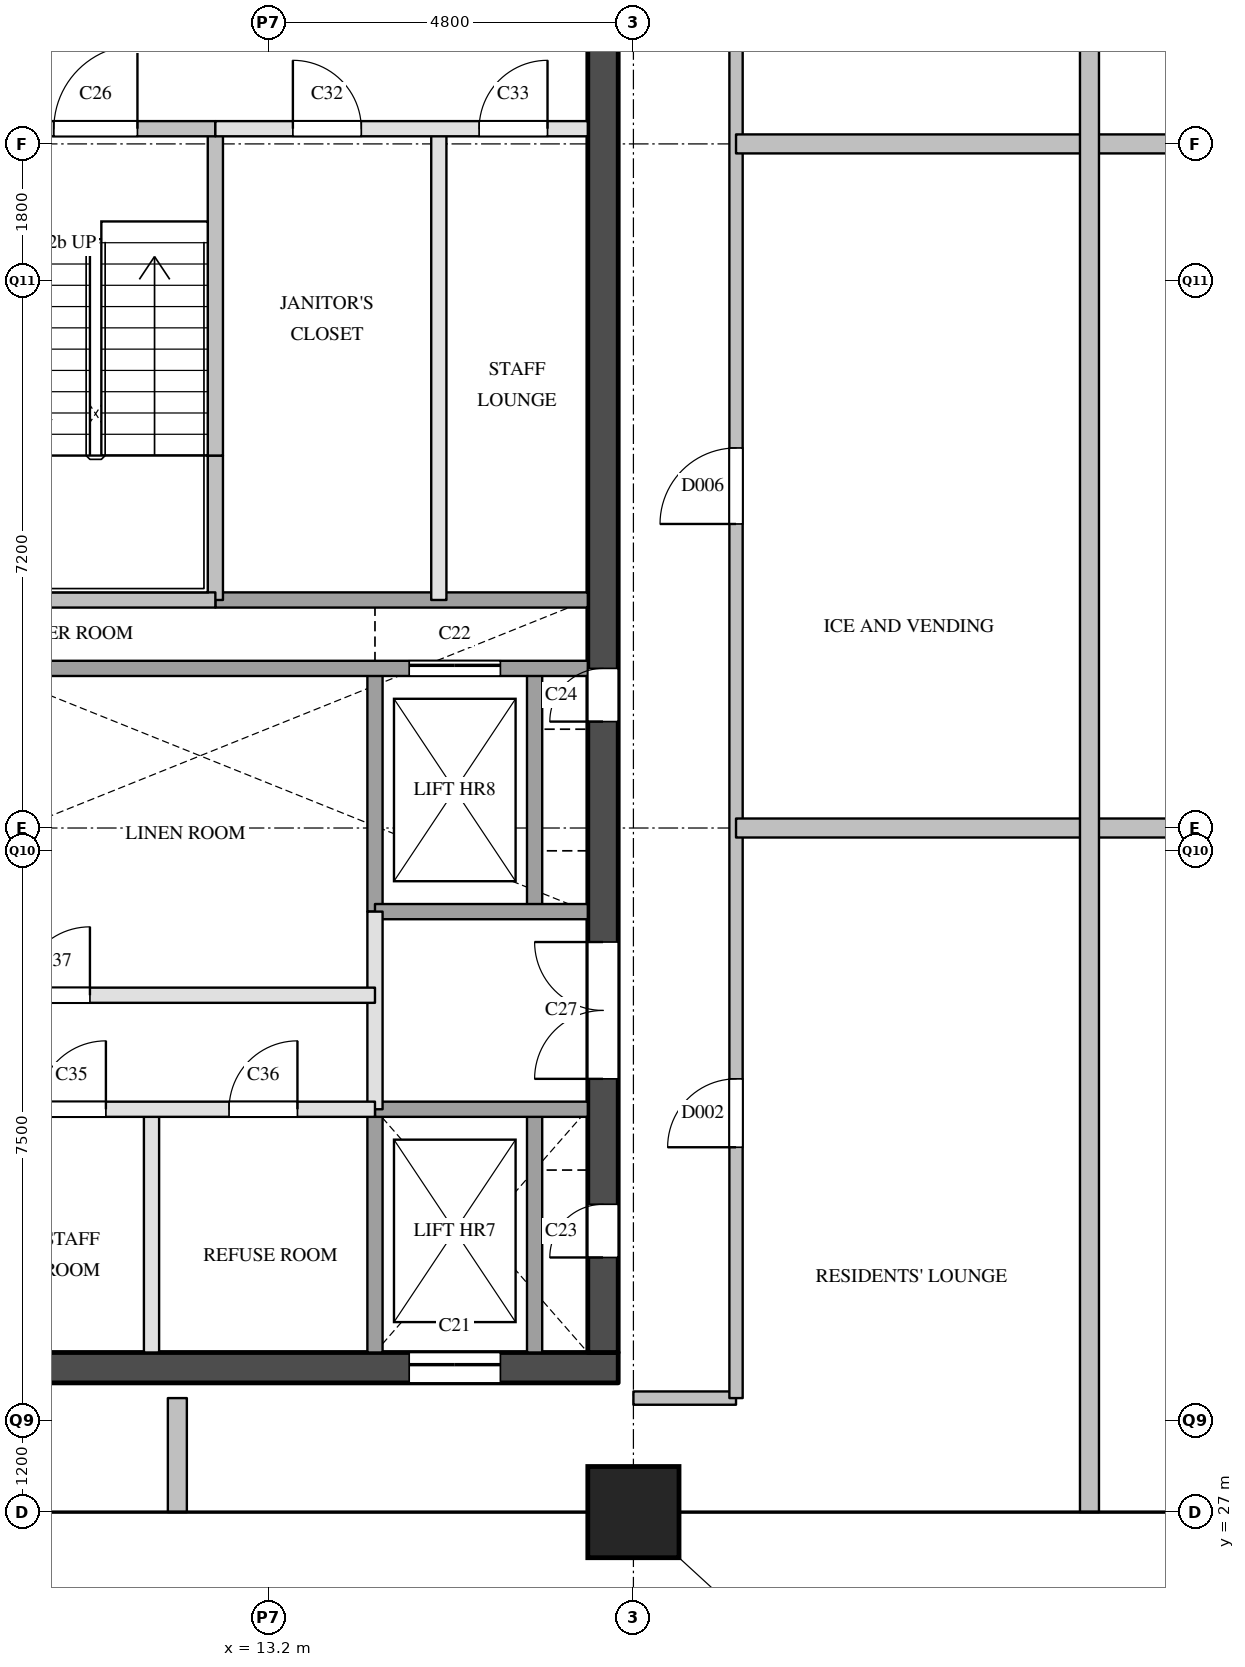
"""IFC4 building model, lengths in metres.
Left out: names, types, materials, properties, quantities, classifications, styles, units other than length and angle.
Written with IfcOpenShell. Run it as: python <this file> out.ifc"""

import sys

from ifc_helpers import new_model, si_unit, direction, frame, frame_2d, origin, origin_2d, place, context, subcontext, project, spatial, rectangle, extrude, element, fill, save


model = new_model("IFC4")
c1 = context("Model", 3, precision=1e-05, world=origin(), true_north=direction((0.0, 1.0)))
c2 = subcontext(c1, "Body", "Model", "MODEL_VIEW")
j1 = project(units=[si_unit("LENGTHUNIT", "METRE"), si_unit("PLANEANGLEUNIT", "RADIAN")], contexts=[c1])
p1 = place(None, origin())
s1 = spatial("IfcSite", under=j1, at=p1, CompositionType="ELEMENT")
p2 = place(p1, origin())
s2 = spatial("IfcBuilding", under=s1, at=p2, CompositionType="ELEMENT")
p3 = place(p2, frame((0.0, 0.0, 226.7)))
s3 = spatial("IfcBuildingStorey", under=s2, at=p3, CompositionType="ELEMENT", Elevation=226.7)
p4 = place(p3, frame((18.0, 27.0, 0.0), z_axis=(0.0, 0.0, 1.0), x_axis=(1.0, 0.0, 0.0)))
e1 = element("IfcColumn", 1, at=p4, inside=s3, PredefinedType="COLUMN", context=c2, shape_type="SweptSolid", body=[
    extrude(rectangle(XDim=1.2, YDim=1.2, at=origin_2d()), origin(), (0.0, 0.0, 1.0), 3.9),
])
p5 = place(p3, frame((5.8, 28.9, 0.0), z_axis=(0.0, 0.0, 1.0), x_axis=(1.0, 0.0, 0.0)))
e2 = element("IfcWall", 2, at=p5, inside=s3, PredefinedType="SHEAR", context=c2, shape_type="SweptSolid", body=[
    extrude(rectangle(XDim=12.0, YDim=0.4, at=frame_2d((6.0, 0.0))), origin(), (0.0, 0.0, 1.0), 3.5),
])
p6 = place(p5, frame((9.25, 0.0, 0.0)))
e3 = element("IfcOpeningElement", 3, at=p6, cuts=e2, PredefinedType="OPENING", context=c2, shape_type="SweptSolid", body=[
    extrude(rectangle(XDim=1.2, YDim=2.1, at=frame_2d((0.6, 1.05))), frame((0.0, 0.21, 0.0), z_axis=(0.0, -1.0, 0.0), x_axis=(1.0, 0.0, 0.0)), (0.0, 0.0, 1.0), 0.42),
])
p7 = place(p3, frame((17.6, 29.1, 0.0), z_axis=(0.0, 0.0, 1.0), x_axis=(0.0, 1.0, 0.0)))
e4 = element("IfcWall", 4, at=p7, inside=s3, PredefinedType="SHEAR", context=c2, shape_type="SweptSolid", body=[
    extrude(rectangle(XDim=20.3, YDim=0.4, at=frame_2d((10.15, 0.0))), origin(), (0.0, 0.0, 1.0), 3.5),
])
p8 = place(p7, frame((1.25, 0.0, 0.0)))
e5 = element("IfcOpeningElement", 5, at=p8, cuts=e4, PredefinedType="OPENING", context=c2, shape_type="SweptSolid", body=[
    extrude(rectangle(XDim=0.7, YDim=2.1, at=frame_2d((0.35, 1.05))), frame((0.0, 0.21, 0.0), z_axis=(0.0, -1.0, 0.0), x_axis=(1.0, 0.0, 0.0)), (0.0, 0.0, 1.0), 0.42),
])
p9 = place(p7, frame((8.3, 0.0, 0.0)))
e6 = element("IfcOpeningElement", 6, at=p9, cuts=e4, PredefinedType="OPENING", context=c2, shape_type="SweptSolid", body=[
    extrude(rectangle(XDim=0.7, YDim=2.1, at=frame_2d((0.35, 1.05))), frame((0.0, 0.21, 0.0), z_axis=(0.0, -1.0, 0.0), x_axis=(1.0, 0.0, 0.0)), (0.0, 0.0, 1.0), 0.42),
])
p10 = place(p7, frame((3.6, 0.0, 0.0)))
e7 = element("IfcOpeningElement", 7, at=p10, cuts=e4, PredefinedType="OPENING", context=c2, shape_type="SweptSolid", body=[
    extrude(rectangle(XDim=1.8, YDim=2.1, at=frame_2d((0.9, 1.05))), frame((0.0, 0.21, 0.0), z_axis=(0.0, -1.0, 0.0), x_axis=(1.0, 0.0, 0.0)), (0.0, 0.0, 1.0), 0.42),
])
p11 = place(p3, frame((11.66, 29.1, 0.0), z_axis=(0.0, 0.0, 1.0), x_axis=(0.0, 1.0, 0.0)))
e8 = element("IfcWall", 8, at=p11, inside=s3, PredefinedType="PARTITIONING", context=c2, shape_type="SweptSolid", body=[
    extrude(rectangle(XDim=3.2, YDim=0.2, at=frame_2d((1.6, 0.0))), origin(), (0.0, 0.0, 1.0), 3.5),
])
p12 = place(p3, frame((12.5, 39.0, 0.0), z_axis=(0.0, 0.0, 1.0), x_axis=(0.0, 1.0, 0.0)))
e9 = element("IfcWall", 9, at=p12, inside=s3, PredefinedType="SOLIDWALL", context=c2, shape_type="SweptSolid", body=[
    extrude(rectangle(XDim=1.9, YDim=0.2, at=frame_2d((0.95, 0.0))), origin(), (0.0, 0.0, 1.0), 3.5),
])
p13 = place(p3, frame((12.5, 40.9, 0.0), z_axis=(0.0, 0.0, 1.0), x_axis=(0.0, 1.0, 0.0)))
e10 = element("IfcWall", 10, at=p13, inside=s3, PredefinedType="SOLIDWALL", context=c2, shape_type="SweptSolid", body=[
    extrude(rectangle(XDim=4.3, YDim=0.2, at=frame_2d((2.15, 0.0))), origin(), (0.0, 0.0, 1.0), 3.5),
])
p14 = place(p3, frame((14.6, 32.3, 0.0), z_axis=(0.0, 0.0, 1.0), x_axis=(0.0, 1.0, 0.0)))
e11 = element("IfcWall", 11, at=p14, inside=s3, PredefinedType="PARTITIONING", context=c2, shape_type="SweptSolid", body=[
    extrude(rectangle(XDim=2.6, YDim=0.2, at=frame_2d((1.3, 0.0))), origin(), (0.0, 0.0, 1.0), 3.5),
])
p15 = place(p3, frame((14.6, 29.1, 0.0), z_axis=(0.0, 0.0, 1.0), x_axis=(0.0, 1.0, 0.0)))
e12 = element("IfcWall", 12, at=p15, inside=s3, PredefinedType="SOLIDWALL", context=c2, shape_type="SweptSolid", body=[
    extrude(rectangle(XDim=3.2, YDim=0.2, at=frame_2d((1.6, 0.0))), origin(), (0.0, 0.0, 1.0), 3.5),
])
p16 = place(p3, frame((14.6, 34.9, 0.0), z_axis=(0.0, 0.0, 1.0), x_axis=(0.0, 1.0, 0.0)))
e13 = element("IfcWall", 13, at=p16, inside=s3, PredefinedType="SOLIDWALL", context=c2, shape_type="SweptSolid", body=[
    extrude(rectangle(XDim=3.2, YDim=0.2, at=frame_2d((1.6, 0.0))), origin(), (0.0, 0.0, 1.0), 3.5),
])
p17 = place(p3, frame((15.44, 39.0, 0.0), z_axis=(0.0, 0.0, 1.0), x_axis=(0.0, 1.0, 0.0)))
e14 = element("IfcWall", 14, at=p17, inside=s3, PredefinedType="PARTITIONING", context=c2, shape_type="SweptSolid", body=[
    extrude(rectangle(XDim=6.2, YDim=0.2, at=frame_2d((3.1, 0.0))), origin(), (0.0, 0.0, 1.0), 3.5),
])
p18 = place(p3, frame((16.7, 29.1, 0.0), z_axis=(0.0, 0.0, 1.0), x_axis=(0.0, 1.0, 0.0)))
e15 = element("IfcWall", 15, at=p18, inside=s3, PredefinedType="SOLIDWALL", context=c2, shape_type="SweptSolid", body=[
    extrude(rectangle(XDim=3.2, YDim=0.2, at=frame_2d((1.6, 0.0))), origin(), (0.0, 0.0, 1.0), 3.5),
])
p19 = place(p3, frame((16.7, 34.9, 0.0), z_axis=(0.0, 0.0, 1.0), x_axis=(0.0, 1.0, 0.0)))
e16 = element("IfcWall", 16, at=p19, inside=s3, PredefinedType="SOLIDWALL", context=c2, shape_type="SweptSolid", body=[
    extrude(rectangle(XDim=3.2, YDim=0.2, at=frame_2d((1.6, 0.0))), origin(), (0.0, 0.0, 1.0), 3.5),
])
p20 = place(p3, frame((6.2, 32.3, 0.0), z_axis=(0.0, 0.0, 1.0), x_axis=(1.0, 0.0, 0.0)))
e17 = element("IfcWall", 17, at=p20, inside=s3, PredefinedType="PARTITIONING", context=c2, shape_type="SweptSolid", body=[
    extrude(rectangle(XDim=8.4, YDim=0.2, at=frame_2d((4.2, 0.0))), origin(), (0.0, 0.0, 1.0), 3.5),
])
p21 = place(p20, frame((1.23, 0.0, 0.0)))
e18 = element("IfcOpeningElement", 18, at=p21, cuts=e17, PredefinedType="OPENING", context=c2, shape_type="SweptSolid", body=[
    extrude(rectangle(XDim=0.9, YDim=2.1, at=frame_2d((0.45, 1.05))), frame((0.0, 0.11, 0.0), z_axis=(0.0, -1.0, 0.0), x_axis=(1.0, 0.0, 0.0)), (0.0, 0.0, 1.0), 0.22),
])
p22 = place(p20, frame((3.96, 0.0, 0.0)))
e19 = element("IfcOpeningElement", 19, at=p22, cuts=e17, PredefinedType="OPENING", context=c2, shape_type="SweptSolid", body=[
    extrude(rectangle(XDim=0.9, YDim=2.1, at=frame_2d((0.45, 1.05))), frame((0.0, 0.11, 0.0), z_axis=(0.0, -1.0, 0.0), x_axis=(1.0, 0.0, 0.0)), (0.0, 0.0, 1.0), 0.22),
])
p23 = place(p20, frame((6.48, 0.0, 0.0)))
e20 = element("IfcOpeningElement", 20, at=p23, cuts=e17, PredefinedType="OPENING", context=c2, shape_type="SweptSolid", body=[
    extrude(rectangle(XDim=0.9, YDim=2.1, at=frame_2d((0.45, 1.05))), frame((0.0, 0.11, 0.0), z_axis=(0.0, -1.0, 0.0), x_axis=(1.0, 0.0, 0.0)), (0.0, 0.0, 1.0), 0.22),
])
p24 = place(p3, frame((14.6, 32.3, 0.0), z_axis=(0.0, 0.0, 1.0), x_axis=(1.0, 0.0, 0.0)))
e21 = element("IfcWall", 21, at=p24, inside=s3, PredefinedType="SOLIDWALL", context=c2, shape_type="SweptSolid", body=[
    extrude(rectangle(XDim=2.8, YDim=0.2, at=frame_2d((1.4, 0.0))), origin(), (0.0, 0.0, 1.0), 3.5),
])
p25 = place(p3, frame((6.2, 33.8, 0.0), z_axis=(0.0, 0.0, 1.0), x_axis=(1.0, 0.0, 0.0)))
e22 = element("IfcWall", 22, at=p25, inside=s3, PredefinedType="PARTITIONING", context=c2, shape_type="SweptSolid", body=[
    extrude(rectangle(XDim=8.4, YDim=0.2, at=frame_2d((4.2, 0.0))), origin(), (0.0, 0.0, 1.0), 3.5),
])
p26 = place(p25, frame((3.75, 0.0, 0.0)))
e23 = element("IfcOpeningElement", 23, at=p26, cuts=e22, PredefinedType="OPENING", context=c2, shape_type="SweptSolid", body=[
    extrude(rectangle(XDim=0.9, YDim=2.1, at=frame_2d((0.45, 1.05))), frame((0.0, 0.11, 0.0), z_axis=(0.0, -1.0, 0.0), x_axis=(1.0, 0.0, 0.0)), (0.0, 0.0, 1.0), 0.22),
])
p27 = place(p3, frame((14.6, 34.9, 0.0), z_axis=(0.0, 0.0, 1.0), x_axis=(1.0, 0.0, 0.0)))
e24 = element("IfcWall", 24, at=p27, inside=s3, PredefinedType="SOLIDWALL", context=c2, shape_type="SweptSolid", body=[
    extrude(rectangle(XDim=2.8, YDim=0.2, at=frame_2d((1.4, 0.0))), origin(), (0.0, 0.0, 1.0), 3.5),
])
p28 = place(p3, frame((6.2, 38.1, 0.0), z_axis=(0.0, 0.0, 1.0), x_axis=(1.0, 0.0, 0.0)))
e25 = element("IfcWall", 25, at=p28, inside=s3, PredefinedType="SOLIDWALL", context=c2, shape_type="SweptSolid", body=[
    extrude(rectangle(XDim=11.2, YDim=0.2, at=frame_2d((5.6, 0.0))), origin(), (0.0, 0.0, 1.0), 3.5),
])
p29 = place(p28, frame((8.85, 0.0, 0.0)))
e26 = element("IfcOpeningElement", 26, at=p29, cuts=e25, PredefinedType="OPENING", context=c2, shape_type="SweptSolid", body=[
    extrude(rectangle(XDim=1.2, YDim=2.1, at=frame_2d((0.6, 1.05))), frame((0.0, 0.11, 0.0), z_axis=(0.0, -1.0, 0.0), x_axis=(1.0, 0.0, 0.0)), (0.0, 0.0, 1.0), 0.22),
])
p30 = place(p3, frame((12.5, 39.0, 0.0), z_axis=(0.0, 0.0, 1.0), x_axis=(1.0, 0.0, 0.0)))
e27 = element("IfcWall", 27, at=p30, inside=s3, PredefinedType="SOLIDWALL", context=c2, shape_type="SweptSolid", body=[
    extrude(rectangle(XDim=4.9, YDim=0.2, at=frame_2d((2.45, 0.0))), origin(), (0.0, 0.0, 1.0), 3.5),
])
p31 = place(p3, frame((9.45, 39.0, 0.0), z_axis=(0.0, 0.0, 1.0), x_axis=(1.0, 0.0, 0.0)))
e28 = element("IfcWall", 28, at=p31, inside=s3, PredefinedType="SOLIDWALL", context=c2, shape_type="SweptSolid", body=[
    extrude(rectangle(XDim=3.05, YDim=0.2, at=frame_2d((1.525, 0.0))), origin(), (0.0, 0.0, 1.0), 3.5),
])
p32 = place(p3, frame((12.5, 45.2, 0.0), z_axis=(0.0, 0.0, 1.0), x_axis=(1.0, 0.0, 0.0)))
e29 = element("IfcWall", 29, at=p32, inside=s3, PredefinedType="PARTITIONING", context=c2, shape_type="SweptSolid", body=[
    extrude(rectangle(XDim=4.9, YDim=0.2, at=frame_2d((2.45, 0.0))), origin(), (0.0, 0.0, 1.0), 3.5),
])
p33 = place(p32, frame((1.02, 0.0, 0.0)))
e30 = element("IfcOpeningElement", 30, at=p33, cuts=e29, PredefinedType="OPENING", context=c2, shape_type="SweptSolid", body=[
    extrude(rectangle(XDim=0.9, YDim=2.1, at=frame_2d((0.45, 1.05))), frame((0.0, 0.11, 0.0), z_axis=(0.0, -1.0, 0.0), x_axis=(1.0, 0.0, 0.0)), (0.0, 0.0, 1.0), 0.22),
])
p34 = place(p32, frame((3.47, 0.0, 0.0)))
e31 = element("IfcOpeningElement", 31, at=p34, cuts=e29, PredefinedType="OPENING", context=c2, shape_type="SweptSolid", body=[
    extrude(rectangle(XDim=0.9, YDim=2.1, at=frame_2d((0.45, 1.05))), frame((0.0, 0.11, 0.0), z_axis=(0.0, -1.0, 0.0), x_axis=(1.0, 0.0, 0.0)), (0.0, 0.0, 1.0), 0.22),
])
p35 = place(p3, frame((6.2, 45.2, 0.0), z_axis=(0.0, 0.0, 1.0), x_axis=(1.0, 0.0, 0.0)))
e32 = element("IfcWall", 32, at=p35, inside=s3, PredefinedType="SOLIDWALL", context=c2, shape_type="SweptSolid", body=[
    extrude(rectangle(XDim=6.3, YDim=0.2, at=frame_2d((3.15, 0.0))), origin(), (0.0, 0.0, 1.0), 3.5),
])
p36 = place(p35, frame((1.025, 0.0, 0.0)))
e33 = element("IfcOpeningElement", 33, at=p36, cuts=e32, PredefinedType="OPENING", context=c2, shape_type="SweptSolid", body=[
    extrude(rectangle(XDim=1.1, YDim=2.1, at=frame_2d((0.55, 1.05))), frame((0.0, 0.11, 0.0), z_axis=(0.0, -1.0, 0.0), x_axis=(1.0, 0.0, 0.0)), (0.0, 0.0, 1.0), 0.22),
])
p37 = place(p35, frame((4.175, 0.0, 0.0)))
e34 = element("IfcOpeningElement", 34, at=p37, cuts=e32, PredefinedType="OPENING", context=c2, shape_type="SweptSolid", body=[
    extrude(rectangle(XDim=1.1, YDim=2.1, at=frame_2d((0.55, 1.05))), frame((0.0, 0.11, 0.0), z_axis=(0.0, -1.0, 0.0), x_axis=(1.0, 0.0, 0.0)), (0.0, 0.0, 1.0), 0.22),
])
p38 = place(p3, frame((18.0, 28.5, 0.0), z_axis=(0.0, 0.0, 1.0), x_axis=(1.0, 0.0, 0.0)))
e35 = element("IfcWall", 35, at=p38, inside=s3, PredefinedType="PARTITIONING", context=c2, shape_type="SweptSolid", body=[
    extrude(rectangle(XDim=1.35, YDim=0.175, at=frame_2d((0.675, 0.0))), origin(), (0.0, 0.0, 1.0), 3.5),
])
p39 = place(p3, frame((19.35, 28.5, 0.0), z_axis=(0.0, 0.0, 1.0), x_axis=(0.0, 1.0, 0.0)))
e36 = element("IfcWall", 36, at=p39, inside=s3, PredefinedType="PARTITIONING", context=c2, shape_type="SweptSolid", body=[
    extrude(rectangle(XDim=22.85, YDim=0.175, at=frame_2d((11.425, 0.0))), origin(), (0.0, 0.0, 1.0), 3.5),
])
p40 = place(p39, frame((3.3, 0.0, 0.0)))
e37 = element("IfcOpeningElement", 37, at=p40, cuts=e36, PredefinedType="OPENING", context=c2, shape_type="SweptSolid", body=[
    extrude(rectangle(XDim=0.9, YDim=2.1, at=frame_2d((0.45, 1.05))), frame((0.0, 0.097, 0.0), z_axis=(0.0, -1.0, 0.0), x_axis=(1.0, 0.0, 0.0)), (0.0, 0.0, 1.0), 0.195),
])
p41 = place(p39, frame((11.5, 0.0, 0.0)))
e38 = element("IfcOpeningElement", 38, at=p41, cuts=e36, PredefinedType="OPENING", context=c2, shape_type="SweptSolid", body=[
    extrude(rectangle(XDim=1.0, YDim=2.1, at=frame_2d((0.5, 1.05))), frame((0.0, 0.097, 0.0), z_axis=(0.0, -1.0, 0.0), x_axis=(1.0, 0.0, 0.0)), (0.0, 0.0, 1.0), 0.195),
])
p42 = place(p39, frame((19.225, 0.0, 0.0)))
e39 = element("IfcOpeningElement", 39, at=p42, cuts=e36, PredefinedType="OPENING", context=c2, shape_type="SweptSolid", body=[
    extrude(rectangle(XDim=0.9, YDim=2.1, at=frame_2d((0.45, 1.05))), frame((0.0, 0.097, 0.0), z_axis=(0.0, -1.0, 0.0), x_axis=(1.0, 0.0, 0.0)), (0.0, 0.0, 1.0), 0.195),
])
for number, where, z_axis, x_axis in (
    (40, (19.35, 36.0, 0.0), (0.0, 0.0, 1.0), (1.0, 0.0, 0.0)),
    (41, (19.35, 45.0, 0.0), (0.0, 0.0, 1.0), (1.0, 0.0, 0.0)),
):
    element("IfcWall", number, at=place(p3, frame(where, z_axis=z_axis, x_axis=x_axis)), inside=s3, PredefinedType="PARTITIONING", context=c2, shape_type="SweptSolid", body=[
        extrude(rectangle(XDim=15.3, YDim=0.25, at=frame_2d((7.65, 0.0))), origin(), (0.0, 0.0, 1.0), 3.5),
    ])
p43 = place(p3, frame((12.0, 27.0, 0.0), z_axis=(0.0, 0.0, 1.0), x_axis=(0.0, 1.0, 0.0)))
e42 = element("IfcWall", 42, at=p43, inside=s3, PredefinedType="PARTITIONING", context=c2, shape_type="SweptSolid", body=[
    extrude(rectangle(XDim=1.5, YDim=0.25, at=frame_2d((0.75, 0.0))), origin(), (0.0, 0.0, 1.0), 2.5),
])
p44 = place(p3, frame((24.0, 27.0, 0.0), z_axis=(0.0, 0.0, 1.0), x_axis=(0.0, 1.0, 0.0)))
e43 = element("IfcWall", 43, at=p44, inside=s3, PredefinedType="PARTITIONING", context=c2, shape_type="SweptSolid", body=[
    extrude(rectangle(XDim=27.0, YDim=0.25, at=frame_2d((13.5, 0.0))), origin(), (0.0, 0.0, 1.0), 3.5),
])
p45 = place(p6, origin())
e44 = element("IfcDoor", 44, at=p45, inside=s3, OperationType="SLIDING_TO_LEFT", PredefinedType="DOOR", context=c2, shape_type="SweptSolid", body=[
    extrude(rectangle(XDim=1.2, YDim=2.1, at=frame_2d((0.6, 1.05))), frame((0.0, 0.025, 0.0), z_axis=(0.0, -1.0, 0.0), x_axis=(1.0, 0.0, 0.0)), (0.0, 0.0, 1.0), 0.05),
])
fill(e3, e44)
p46 = place(p29, origin())
e45 = element("IfcDoor", 45, at=p46, inside=s3, OperationType="SLIDING_TO_LEFT", PredefinedType="DOOR", context=c2, shape_type="SweptSolid", body=[
    extrude(rectangle(XDim=1.2, YDim=2.1, at=frame_2d((0.6, 1.05))), frame((0.0, 0.025, 0.0), z_axis=(0.0, -1.0, 0.0), x_axis=(1.0, 0.0, 0.0)), (0.0, 0.0, 1.0), 0.05),
])
fill(e26, e45)
p47 = place(p8, origin())
e46 = element("IfcDoor", 46, at=p47, inside=s3, OperationType="SINGLE_SWING_LEFT", PredefinedType="DOOR", context=c2, shape_type="SweptSolid", body=[
    extrude(rectangle(XDim=0.7, YDim=2.1, at=frame_2d((0.35, 1.05))), frame((0.0, 0.025, 0.0), z_axis=(0.0, -1.0, 0.0), x_axis=(1.0, 0.0, 0.0)), (0.0, 0.0, 1.0), 0.05),
])
fill(e5, e46)
p48 = place(p9, origin())
e47 = element("IfcDoor", 47, at=p48, inside=s3, OperationType="SINGLE_SWING_LEFT", PredefinedType="DOOR", context=c2, shape_type="SweptSolid", body=[
    extrude(rectangle(XDim=0.7, YDim=2.1, at=frame_2d((0.35, 1.05))), frame((0.0, 0.025, 0.0), z_axis=(0.0, -1.0, 0.0), x_axis=(1.0, 0.0, 0.0)), (0.0, 0.0, 1.0), 0.05),
])
fill(e6, e47)
p49 = place(p37, origin())
e48 = element("IfcDoor", 48, at=p49, inside=s3, OperationType="SINGLE_SWING_RIGHT", PredefinedType="DOOR", context=c2, shape_type="SweptSolid", body=[
    extrude(rectangle(XDim=1.1, YDim=2.1, at=frame_2d((0.55, 1.05))), frame((0.0, 0.025, 0.0), z_axis=(0.0, -1.0, 0.0), x_axis=(1.0, 0.0, 0.0)), (0.0, 0.0, 1.0), 0.05),
])
fill(e34, e48)
p50 = place(p10, origin())
e49 = element("IfcDoor", 49, at=p50, inside=s3, OperationType="DOUBLE_DOOR_SINGLE_SWING", PredefinedType="DOOR", context=c2, shape_type="SweptSolid", body=[
    extrude(rectangle(XDim=1.8, YDim=2.1, at=frame_2d((0.9, 1.05))), frame((0.0, 0.025, 0.0), z_axis=(0.0, -1.0, 0.0), x_axis=(1.0, 0.0, 0.0)), (0.0, 0.0, 1.0), 0.05),
])
fill(e7, e49)
p51 = place(p33, origin())
e50 = element("IfcDoor", 50, at=p51, inside=s3, OperationType="SINGLE_SWING_LEFT", PredefinedType="DOOR", context=c2, shape_type="SweptSolid", body=[
    extrude(rectangle(XDim=0.9, YDim=2.1, at=frame_2d((0.45, 1.05))), frame((0.0, 0.025, 0.0), z_axis=(0.0, -1.0, 0.0), x_axis=(1.0, 0.0, 0.0)), (0.0, 0.0, 1.0), 0.05),
])
fill(e30, e50)
p52 = place(p34, origin())
e51 = element("IfcDoor", 51, at=p52, inside=s3, OperationType="SINGLE_SWING_RIGHT", PredefinedType="DOOR", context=c2, shape_type="SweptSolid", body=[
    extrude(rectangle(XDim=0.9, YDim=2.1, at=frame_2d((0.45, 1.05))), frame((0.0, 0.025, 0.0), z_axis=(0.0, -1.0, 0.0), x_axis=(1.0, 0.0, 0.0)), (0.0, 0.0, 1.0), 0.05),
])
fill(e31, e51)
p53 = place(p22, origin())
e52 = element("IfcDoor", 52, at=p53, inside=s3, OperationType="SINGLE_SWING_RIGHT", PredefinedType="DOOR", context=c2, shape_type="SweptSolid", body=[
    extrude(rectangle(XDim=0.9, YDim=2.1, at=frame_2d((0.45, 1.05))), frame((0.0, 0.025, 0.0), z_axis=(0.0, -1.0, 0.0), x_axis=(1.0, 0.0, 0.0)), (0.0, 0.0, 1.0), 0.05),
])
fill(e19, e52)
p54 = place(p23, origin())
e53 = element("IfcDoor", 53, at=p54, inside=s3, OperationType="SINGLE_SWING_RIGHT", PredefinedType="DOOR", context=c2, shape_type="SweptSolid", body=[
    extrude(rectangle(XDim=0.9, YDim=2.1, at=frame_2d((0.45, 1.05))), frame((0.0, 0.025, 0.0), z_axis=(0.0, -1.0, 0.0), x_axis=(1.0, 0.0, 0.0)), (0.0, 0.0, 1.0), 0.05),
])
fill(e20, e53)
p55 = place(p26, origin())
e54 = element("IfcDoor", 54, at=p55, inside=s3, OperationType="SINGLE_SWING_RIGHT", PredefinedType="DOOR", context=c2, shape_type="SweptSolid", body=[
    extrude(rectangle(XDim=0.9, YDim=2.1, at=frame_2d((0.45, 1.05))), frame((0.0, 0.025, 0.0), z_axis=(0.0, -1.0, 0.0), x_axis=(1.0, 0.0, 0.0)), (0.0, 0.0, 1.0), 0.05),
])
fill(e23, e54)
p56 = place(p40, origin())
e55 = element("IfcDoor", 55, at=p56, inside=s3, OperationType="SINGLE_SWING_LEFT", PredefinedType="DOOR", context=c2, shape_type="SweptSolid", body=[
    extrude(rectangle(XDim=0.9, YDim=2.1, at=frame_2d((0.45, 1.05))), frame((0.0, 0.025, 0.0), z_axis=(0.0, -1.0, 0.0), x_axis=(1.0, 0.0, 0.0)), (0.0, 0.0, 1.0), 0.05),
])
fill(e37, e55)
p57 = place(p41, origin())
e56 = element("IfcDoor", 56, at=p57, inside=s3, OperationType="SINGLE_SWING_LEFT", PredefinedType="DOOR", context=c2, shape_type="SweptSolid", body=[
    extrude(rectangle(XDim=1.0, YDim=2.1, at=frame_2d((0.5, 1.05))), frame((0.0, 0.025, 0.0), z_axis=(0.0, -1.0, 0.0), x_axis=(1.0, 0.0, 0.0)), (0.0, 0.0, 1.0), 0.05),
])
fill(e38, e56)
save(model, sys.argv[1])
